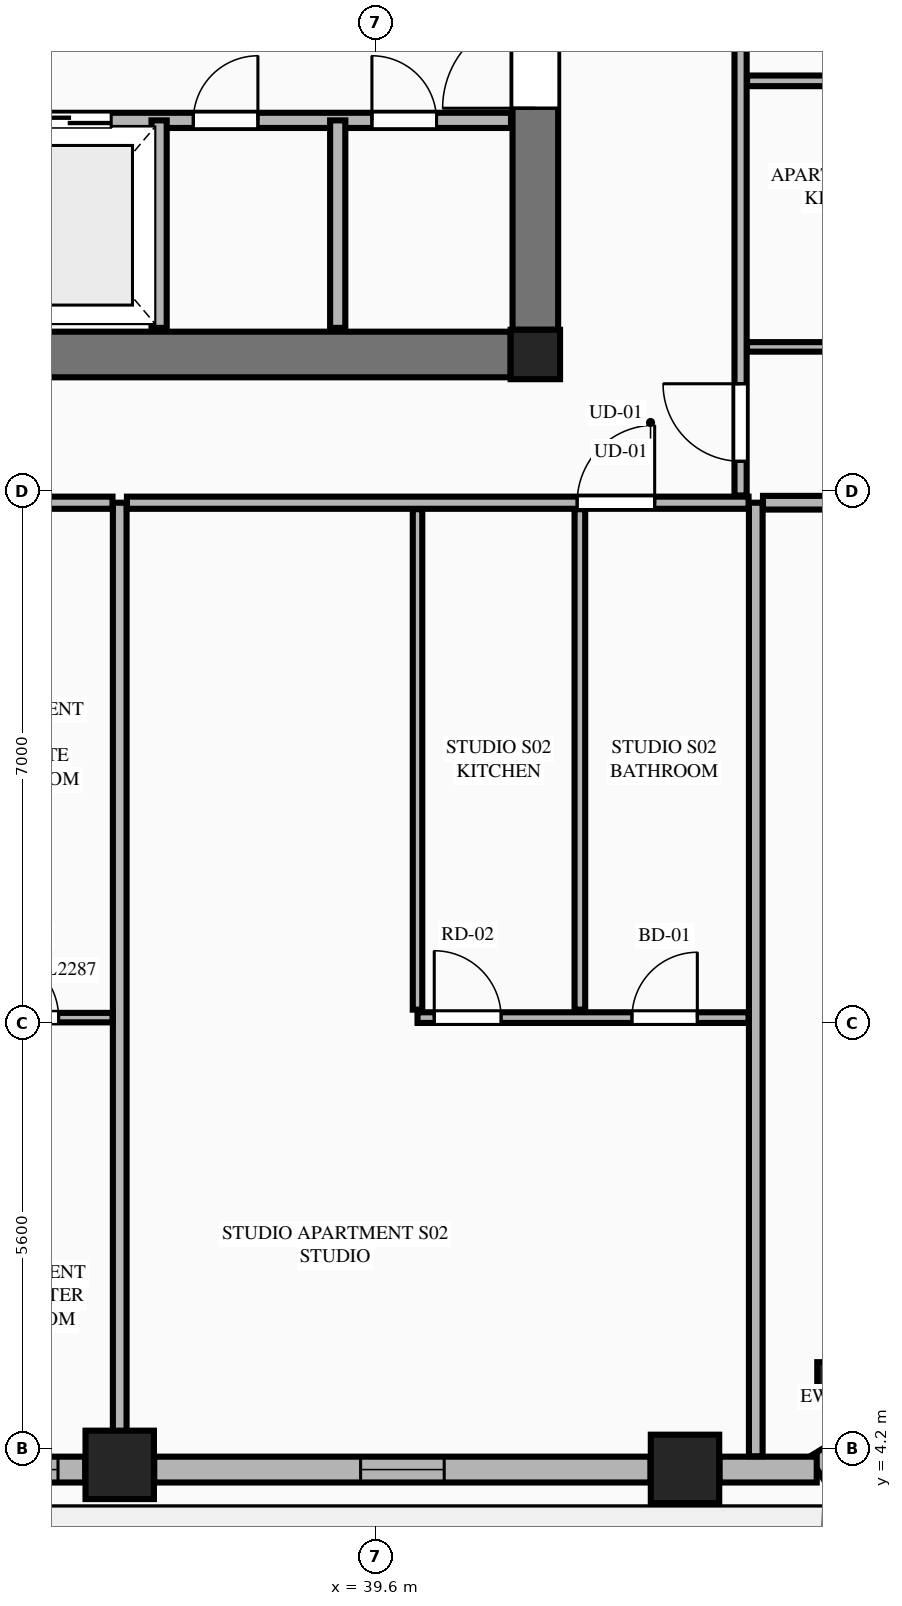
"""IFC4 building model, lengths in metres.
Left out: names, types, materials, properties, quantities, classifications, styles, units other than length and angle.
Written with IfcOpenShell. Run it as: python <this file> out.ifc"""

import sys

from ifc_helpers import new_model, si_unit, direction, frame, frame_2d, origin, origin_2d, place, context, subcontext, project, spatial, rectangle, extrude, element, fill, save


model = new_model("IFC4")
c1 = context("Model", 3, precision=1e-05, world=origin(), true_north=direction((0.0, 1.0)))
c2 = subcontext(c1, "Body", "Model", "MODEL_VIEW")
j1 = project(units=[si_unit("LENGTHUNIT", "METRE"), si_unit("PLANEANGLEUNIT", "RADIAN")], contexts=[c1])
p1 = place(None, origin())
s1 = spatial("IfcSite", under=j1, at=p1, CompositionType="ELEMENT")
p2 = place(p1, origin())
s2 = spatial("IfcBuilding", under=s1, at=p2, CompositionType="ELEMENT")
p3 = place(p2, frame((0.0, 0.0, 153.5)))
s3 = spatial("IfcBuildingStorey", under=s2, at=p3, CompositionType="ELEMENT", Elevation=153.5)
p4 = place(p3, frame((41.7, 18.6, 0.0), z_axis=(0.0, 0.0, 1.0), x_axis=(1.0, 0.0, 0.0)))
e1 = element("IfcColumn", 1, at=p4, inside=s3, PredefinedType="COLUMN", context=c2, shape_type="SweptSolid", body=[
    extrude(rectangle(XDim=0.65, YDim=0.65, at=origin_2d()), origin(), (0.0, 0.0, 1.0), 3.55),
])
p5 = place(p3, frame((23.425, 18.6, 0.0), z_axis=(0.0, 0.0, 1.0), x_axis=(1.0, 0.0, 0.0)))
e2 = element("IfcWall", 2, at=p5, inside=s3, PredefinedType="SHEAR", context=c2, shape_type="SweptSolid", body=[
    extrude(rectangle(XDim=17.95, YDim=0.6, at=frame_2d((8.975, 0.0))), origin(), (0.0, 0.0, 1.0), 3.34),
])
p6 = place(p3, frame((41.7, 18.925, 0.0), z_axis=(0.0, 0.0, 1.0), x_axis=(0.0, 1.0, 0.0)))
e3 = element("IfcWall", 3, at=p6, inside=s3, PredefinedType="SHEAR", context=c2, shape_type="SweptSolid", body=[
    extrude(rectangle(XDim=13.95, YDim=0.6, at=frame_2d((6.975, 0.0))), origin(), (0.0, 0.0, 1.0), 3.34),
])
p7 = place(p6, frame((2.915, 0.0, 0.0)))
e4 = element("IfcOpeningElement", 4, at=p7, cuts=e3, PredefinedType="OPENING", context=c2, shape_type="SweptSolid", body=[
    extrude(rectangle(XDim=1.22, YDim=2.25, at=frame_2d((0.61, 1.125))), frame((0.0, 0.31, 0.0), z_axis=(0.0, -1.0, 0.0), x_axis=(1.0, 0.0, 0.0)), (0.0, 0.0, 1.0), 0.62),
])
for number, where, z_axis, x_axis in (
    (5, (36.232, 3.992, 0.0), (0.0, 0.0, 1.0), (1.0, 0.0, 0.0)),
    (6, (43.669, 3.939, 0.0), (0.0, 0.0, 1.0), (1.0, 0.0, 0.0)),
):
    element("IfcColumn", number, at=place(p3, frame(where, z_axis=z_axis, x_axis=x_axis)), inside=s3, PredefinedType="COLUMN", context=c2, shape_type="SweptSolid", body=[
        extrude(rectangle(XDim=0.9, YDim=0.9, at=origin_2d()), origin(), (0.0, 0.0, 1.0), 3.55),
    ])
p8 = place(p3, frame((45.659, 5.093, 0.0), z_axis=(0.0, 0.0, 1.0), x_axis=(0.865160173452, 0.501495637342, 0.0)))
e7 = element("IfcColumn", 7, at=p8, inside=s3, PredefinedType="PILASTER", context=c2, shape_type="SweptSolid", body=[
    extrude(rectangle(XDim=0.5, YDim=0.35, at=origin_2d()), origin(), (0.0, 0.0, 1.0), 3.55),
])
p9 = place(p3, frame((23.42, 21.68, 0.0), z_axis=(0.0, 0.0, 1.0), x_axis=(1.0, 0.0, 0.0)))
e8 = element("IfcWall", 8, at=p9, inside=s3, PredefinedType="PLUMBINGWALL", context=c2, shape_type="SweptSolid", body=[
    extrude(rectangle(XDim=17.96, YDim=0.2, at=frame_2d((8.98, 0.0))), origin(), (0.0, 0.0, 1.0), 3.34),
])
p10 = place(p9, frame((11.6, 0.0, 0.0)))
e9 = element("IfcOpeningElement", 9, at=p10, cuts=e8, PredefinedType="OPENING", context=c2, shape_type="SweptSolid", body=[
    extrude(rectangle(XDim=1.1, YDim=2.2, at=frame_2d((0.55, 1.1))), frame((0.0, 0.11, 0.0), z_axis=(0.0, -1.0, 0.0), x_axis=(1.0, 0.0, 0.0)), (0.0, 0.0, 1.0), 0.22),
])
p11 = place(p9, frame((0.41, 0.0, 0.0)))
e10 = element("IfcOpeningElement", 10, at=p11, cuts=e8, PredefinedType="OPENING", context=c2, shape_type="SweptSolid", body=[
    extrude(rectangle(XDim=0.85, YDim=2.05, at=frame_2d((0.425, 1.025))), frame((0.0, 0.11, 0.0), z_axis=(0.0, -1.0, 0.0), x_axis=(1.0, 0.0, 0.0)), (0.0, 0.0, 1.0), 0.22),
])
p12 = place(p9, frame((4.13, 0.0, 0.0)))
e11 = element("IfcOpeningElement", 11, at=p12, cuts=e8, PredefinedType="OPENING", context=c2, shape_type="SweptSolid", body=[
    extrude(rectangle(XDim=0.85, YDim=2.05, at=frame_2d((0.425, 1.025))), frame((0.0, 0.11, 0.0), z_axis=(0.0, -1.0, 0.0), x_axis=(1.0, 0.0, 0.0)), (0.0, 0.0, 1.0), 0.22),
])
p13 = place(p9, frame((7.83, 0.0, 0.0)))
e12 = element("IfcOpeningElement", 12, at=p13, cuts=e8, PredefinedType="OPENING", context=c2, shape_type="SweptSolid", body=[
    extrude(rectangle(XDim=0.85, YDim=2.05, at=frame_2d((0.425, 1.025))), frame((0.0, 0.11, 0.0), z_axis=(0.0, -1.0, 0.0), x_axis=(1.0, 0.0, 0.0)), (0.0, 0.0, 1.0), 0.22),
])
p14 = place(p9, frame((13.78, 0.0, 0.0)))
e13 = element("IfcOpeningElement", 13, at=p14, cuts=e8, PredefinedType="OPENING", context=c2, shape_type="SweptSolid", body=[
    extrude(rectangle(XDim=0.85, YDim=2.05, at=frame_2d((0.425, 1.025))), frame((0.0, 0.11, 0.0), z_axis=(0.0, -1.0, 0.0), x_axis=(1.0, 0.0, 0.0)), (0.0, 0.0, 1.0), 0.22),
])
p15 = place(p9, frame((16.13, 0.0, 0.0)))
e14 = element("IfcOpeningElement", 14, at=p15, cuts=e8, PredefinedType="OPENING", context=c2, shape_type="SweptSolid", body=[
    extrude(rectangle(XDim=0.85, YDim=2.05, at=frame_2d((0.425, 1.025))), frame((0.0, 0.11, 0.0), z_axis=(0.0, -1.0, 0.0), x_axis=(1.0, 0.0, 0.0)), (0.0, 0.0, 1.0), 0.22),
])
for number, where, z_axis, x_axis in (
    (15, (36.75, 18.95, 0.0), (0.0, 0.0, 1.0), (0.0, 1.0, 0.0)),
    (16, (39.1, 18.95, 0.0), (0.0, 0.0, 1.0), (0.0, 1.0, 0.0)),
):
    element("IfcWall", number, at=place(p3, frame(where, z_axis=z_axis, x_axis=x_axis)), inside=s3, PredefinedType="PLUMBINGWALL", context=c2, shape_type="SweptSolid", body=[
        extrude(rectangle(XDim=2.73, YDim=0.2, at=frame_2d((1.365, 0.0))), origin(), (0.0, 0.0, 1.0), 3.34),
    ])
p16 = place(p3, frame((45.397, 3.955, 0.0), z_axis=(0.0, 0.0, 1.0), x_axis=(0.851798915137, 0.523868884523, 0.0)))
e17 = element("IfcWall", 17, at=p16, inside=s3, PredefinedType="STANDARD", context=c2, shape_type="SweptSolid", body=[
    extrude(rectangle(XDim=1.848, YDim=0.34, at=frame_2d((0.924, 0.0))), origin(), (0.0, 0.0, 1.0), 3.34),
])
p17 = place(p3, frame((29.022, 3.93, 0.0), z_axis=(0.0, 0.0, 1.0), x_axis=(1.0, 0.0, 0.0)))
e18 = element("IfcWall", 18, at=p17, inside=s3, PredefinedType="STANDARD", context=c2, shape_type="SweptSolid", body=[
    extrude(rectangle(XDim=6.756, YDim=0.34, at=frame_2d((3.378, 0.0))), origin(), (0.0, 0.0, 1.0), 2.797),
])
p18 = place(p17, frame((1.813, 0.0, 0.0)))
e19 = element("IfcOpeningElement", 19, at=p18, cuts=e18, PredefinedType="OPENING", context=c2, shape_type="SweptSolid", body=[
    extrude(rectangle(XDim=1.1, YDim=2.25, at=frame_2d((0.55, 1.125))), frame((0.0, 0.18, 0.0), z_axis=(0.0, -1.0, 0.0), x_axis=(1.0, 0.0, 0.0)), (0.0, 0.0, 1.0), 0.36),
])
p19 = place(p17, frame((5.298, 0.0, 0.75)))
e20 = element("IfcOpeningElement", 20, at=p19, cuts=e18, PredefinedType="OPENING", context=c2, shape_type="SweptSolid", body=[
    extrude(rectangle(XDim=1.1, YDim=1.897, at=frame_2d((0.55, 0.948))), frame((0.0, 0.18, 0.0), z_axis=(0.0, -1.0, 0.0), x_axis=(1.0, 0.0, 0.0)), (0.0, 0.0, 1.0), 0.36),
])
p20 = place(p3, frame((36.686, 3.93, 0.0), z_axis=(0.0, 0.0, 1.0), x_axis=(1.0, 0.0, 0.0)))
e21 = element("IfcWall", 21, at=p20, inside=s3, PredefinedType="STANDARD", context=c2, shape_type="SweptSolid", body=[
    extrude(rectangle(XDim=6.529, YDim=0.34, at=frame_2d((3.265, 0.0))), origin(), (0.0, 0.0, 1.0), 2.797),
])
p21 = place(p20, frame((2.715, 0.0, 0.75)))
e22 = element("IfcOpeningElement", 22, at=p21, cuts=e21, PredefinedType="OPENING", context=c2, shape_type="SweptSolid", body=[
    extrude(rectangle(XDim=1.1, YDim=1.897, at=frame_2d((0.55, 0.948))), frame((0.0, 0.18, 0.0), z_axis=(0.0, -1.0, 0.0), x_axis=(1.0, 0.0, 0.0)), (0.0, 0.0, 1.0), 0.36),
])
p22 = place(p3, frame((44.123, 3.93, 0.0), z_axis=(0.0, 0.0, 1.0), x_axis=(1.0, 0.0, 0.0)))
e23 = element("IfcWall", 23, at=p22, inside=s3, PredefinedType="STANDARD", context=c2, shape_type="SweptSolid", body=[
    extrude(rectangle(XDim=1.279, YDim=0.34, at=frame_2d((0.64, 0.0))), origin(), (0.0, 0.0, 1.0), 3.34),
])
p23 = place(p3, frame((36.232, 4.105, 0.0), z_axis=(0.0, 0.0, 1.0), x_axis=(0.0, 1.0, 0.0)))
e24 = element("IfcWall", 24, at=p23, inside=s3, PredefinedType="PARTITIONING", context=c2, shape_type="SweptSolid", body=[
    extrude(rectangle(XDim=12.545, YDim=0.18, at=frame_2d((6.272, 0.0))), origin(), (0.0, 0.0, 1.0), 2.722),
])
p24 = place(p3, frame((44.6, 4.105, 0.0), z_axis=(0.0, 0.0, 1.0), x_axis=(0.0, 1.0, 0.0)))
e25 = element("IfcWall", 25, at=p24, inside=s3, PredefinedType="PARTITIONING", context=c2, shape_type="SweptSolid", body=[
    extrude(rectangle(XDim=12.545, YDim=0.18, at=frame_2d((6.272, 0.0))), origin(), (0.0, 0.0, 1.0), 3.34),
])
p25 = place(p3, frame((20.295, 16.65, 0.0), z_axis=(0.0, 0.0, 1.0), x_axis=(1.0, 0.0, 0.0)))
e26 = element("IfcWall", 26, at=p25, inside=s3, PredefinedType="PARTITIONING", context=c2, shape_type="SweptSolid", body=[
    extrude(rectangle(XDim=15.842, YDim=0.16, at=frame_2d((7.921, 0.0))), origin(), (0.0, 0.0, 1.0), 3.34),
])
p26 = place(p25, frame((0.405, 0.0, 0.0)))
e27 = element("IfcOpeningElement", 27, at=p26, cuts=e26, PredefinedType="OPENING", context=c2, shape_type="SweptSolid", body=[
    extrude(rectangle(XDim=1.35, YDim=2.35, at=frame_2d((0.675, 1.175))), frame((0.0, 0.09, 0.0), z_axis=(0.0, -1.0, 0.0), x_axis=(1.0, 0.0, 0.0)), (0.0, 0.0, 1.0), 0.18),
])
p27 = place(p3, frame((33.85, 9.876, 0.0), z_axis=(0.0, 0.0, 1.0), x_axis=(1.0, 0.0, 0.0)))
e28 = element("IfcWall", 28, at=p27, inside=s3, PredefinedType="PARTITIONING", context=c2, shape_type="SweptSolid", body=[
    extrude(rectangle(XDim=2.287, YDim=0.125, at=frame_2d((1.144, 0.0))), origin(), (0.0, 0.0, 1.0), 3.34),
])
p28 = place(p27, frame((0.718, 0.0, 0.0)))
e29 = element("IfcOpeningElement", 29, at=p28, cuts=e28, PredefinedType="OPENING", context=c2, shape_type="SweptSolid", body=[
    extrude(rectangle(XDim=0.86, YDim=2.1, at=frame_2d((0.43, 1.05))), frame((0.0, 0.073, 0.0), z_axis=(0.0, -1.0, 0.0), x_axis=(1.0, 0.0, 0.0)), (0.0, 0.0, 1.0), 0.145),
])
p29 = place(p3, frame((36.327, 16.65, 0.0), z_axis=(0.0, 0.0, 1.0), x_axis=(1.0, 0.0, 0.0)))
e30 = element("IfcWall", 30, at=p29, inside=s3, PredefinedType="PARTITIONING", context=c2, shape_type="SweptSolid", body=[
    extrude(rectangle(XDim=8.178, YDim=0.16, at=frame_2d((4.089, 0.0))), origin(), (0.0, 0.0, 1.0), 3.34),
])
p30 = place(p29, frame((5.923, 0.0, 0.0)))
e31 = element("IfcOpeningElement", 31, at=p30, cuts=e30, PredefinedType="OPENING", context=c2, shape_type="SweptSolid", body=[
    extrude(rectangle(XDim=1.02, YDim=2.25, at=frame_2d((0.51, 1.125))), frame((0.0, 0.09, 0.0), z_axis=(0.0, -1.0, 0.0), x_axis=(1.0, 0.0, 0.0)), (0.0, 0.0, 1.0), 0.18),
])
p31 = place(p3, frame((40.15, 9.981, 0.0), z_axis=(0.0, 0.0, 1.0), x_axis=(0.0, 1.0, 0.0)))
e32 = element("IfcWall", 32, at=p31, inside=s3, PredefinedType="PARTITIONING", context=c2, shape_type="SweptSolid", body=[
    extrude(rectangle(XDim=6.584, YDim=0.125, at=frame_2d((3.292, 0.0))), origin(), (0.0, 0.0, 1.0), 3.34),
])
p32 = place(p3, frame((40.15, 9.876, 0.0), z_axis=(0.0, 0.0, 1.0), x_axis=(1.0, 0.0, 0.0)))
e33 = element("IfcWall", 33, at=p32, inside=s3, PredefinedType="PLUMBINGWALL", context=c2, shape_type="SweptSolid", body=[
    extrude(rectangle(XDim=4.355, YDim=0.14, at=frame_2d((2.177, 0.0))), origin(), (0.0, 0.0, 1.0), 3.34),
])
p33 = place(p32, frame((2.821, 0.0, 0.0)))
e34 = element("IfcOpeningElement", 34, at=p33, cuts=e33, PredefinedType="OPENING", context=c2, shape_type="SweptSolid", body=[
    extrude(rectangle(XDim=0.86, YDim=2.1, at=frame_2d((0.43, 1.05))), frame((0.0, 0.08, 0.0), z_axis=(0.0, -1.0, 0.0), x_axis=(1.0, 0.0, 0.0)), (0.0, 0.0, 1.0), 0.16),
])
p34 = place(p32, frame((0.22, 0.0, 0.0)))
e35 = element("IfcOpeningElement", 35, at=p34, cuts=e33, PredefinedType="OPENING", context=c2, shape_type="SweptSolid", body=[
    extrude(rectangle(XDim=0.88, YDim=2.15, at=frame_2d((0.44, 1.075))), frame((0.0, 0.08, 0.0), z_axis=(0.0, -1.0, 0.0), x_axis=(1.0, 0.0, 0.0)), (0.0, 0.0, 1.0), 0.16),
])
p35 = place(p3, frame((42.286, 9.981, 0.0), z_axis=(0.0, 0.0, 1.0), x_axis=(0.0, 1.0, 0.0)))
e36 = element("IfcWall", 36, at=p35, inside=s3, PredefinedType="PLUMBINGWALL", context=c2, shape_type="SweptSolid", body=[
    extrude(rectangle(XDim=6.584, YDim=0.14, at=frame_2d((3.292, 0.0))), origin(), (0.0, 0.0, 1.0), 2.722),
])
p36 = place(p3, frame((44.695, 16.65, 0.0), z_axis=(0.0, 0.0, 1.0), x_axis=(1.0, 0.0, 0.0)))
e37 = element("IfcWall", 37, at=p36, inside=s3, PredefinedType="PARTITIONING", context=c2, shape_type="SweptSolid", body=[
    extrude(rectangle(XDim=7.996, YDim=0.18, at=frame_2d((3.998, 0.0))), origin(), (0.0, 0.0, 1.0), 3.34),
])
p37 = place(p3, frame((44.4, 16.745, 0.0), z_axis=(0.0, 0.0, 1.0), x_axis=(0.0, 1.0, 0.0)))
e38 = element("IfcWall", 38, at=p37, inside=s3, PredefinedType="PARTITIONING", context=c2, shape_type="SweptSolid", body=[
    extrude(rectangle(XDim=18.31, YDim=0.16, at=frame_2d((9.155, 0.0))), origin(), (0.0, 0.0, 1.0), 3.34),
])
p38 = place(p37, frame((0.45, 0.0, 0.0)))
e39 = element("IfcOpeningElement", 39, at=p38, cuts=e38, PredefinedType="OPENING", context=c2, shape_type="SweptSolid", body=[
    extrude(rectangle(XDim=1.02, YDim=2.25, at=frame_2d((0.51, 1.125))), frame((0.0, 0.09, 0.0), z_axis=(0.0, -1.0, 0.0), x_axis=(1.0, 0.0, 0.0)), (0.0, 0.0, 1.0), 0.18),
])
p39 = place(p3, frame((44.485, 18.7, 0.0), z_axis=(0.0, 0.0, 1.0), x_axis=(1.0, 0.0, 0.0)))
e40 = element("IfcWall", 40, at=p39, inside=s3, PredefinedType="PARTITIONING", context=c2, shape_type="SweptSolid", body=[
    extrude(rectangle(XDim=2.83, YDim=0.125, at=frame_2d((1.415, 0.0))), origin(), (0.0, 0.0, 1.0), 2.722),
])
p40 = place(p3, frame((44.485, 22.2, 0.0), z_axis=(0.0, 0.0, 1.0), x_axis=(1.0, 0.0, 0.0)))
e41 = element("IfcWall", 41, at=p40, inside=s3, PredefinedType="PLUMBINGWALL", context=c2, shape_type="SweptSolid", body=[
    extrude(rectangle(XDim=2.83, YDim=0.14, at=frame_2d((1.415, 0.0))), origin(), (0.0, 0.0, 1.0), 3.34),
])
p41 = place(p7, origin())
e42 = element("IfcDoor", 42, at=p41, inside=s3, OperationType="SINGLE_SWING_LEFT", PredefinedType="DOOR", context=c2, shape_type="SweptSolid", body=[
    extrude(rectangle(XDim=1.22, YDim=2.25, at=frame_2d((0.61, 1.125))), frame((0.0, 0.025, 0.0), z_axis=(0.0, -1.0, 0.0), x_axis=(1.0, 0.0, 0.0)), (0.0, 0.0, 1.0), 0.05),
])
fill(e4, e42)
p42 = place(p10, origin())
e43 = element("IfcDoor", 43, at=p42, inside=s3, OperationType="DOUBLE_DOOR_SLIDING", PredefinedType="DOOR", context=c2, shape_type="SweptSolid", body=[
    extrude(rectangle(XDim=1.1, YDim=2.2, at=frame_2d((0.55, 1.1))), frame((0.0, 0.025, 0.0), z_axis=(0.0, -1.0, 0.0), x_axis=(1.0, 0.0, 0.0)), (0.0, 0.0, 1.0), 0.05),
])
fill(e9, e43)
p43 = place(p14, origin())
e44 = element("IfcDoor", 44, at=p43, inside=s3, OperationType="SINGLE_SWING_RIGHT", PredefinedType="DOOR", context=c2, shape_type="SweptSolid", body=[
    extrude(rectangle(XDim=0.85, YDim=2.05, at=frame_2d((0.425, 1.025))), frame((0.0, 0.025, 0.0), z_axis=(0.0, -1.0, 0.0), x_axis=(1.0, 0.0, 0.0)), (0.0, 0.0, 1.0), 0.05),
])
fill(e13, e44)
p44 = place(p15, origin())
e45 = element("IfcDoor", 45, at=p44, inside=s3, OperationType="SINGLE_SWING_LEFT", PredefinedType="DOOR", context=c2, shape_type="SweptSolid", body=[
    extrude(rectangle(XDim=0.85, YDim=2.05, at=frame_2d((0.425, 1.025))), frame((0.0, 0.025, 0.0), z_axis=(0.0, -1.0, 0.0), x_axis=(1.0, 0.0, 0.0)), (0.0, 0.0, 1.0), 0.05),
])
fill(e14, e45)
p45 = place(p21, origin())
e46 = element("IfcWindow", 46, at=p45, inside=s3, PartitioningType="SINGLE_PANEL", PredefinedType="WINDOW", context=c2, shape_type="SweptSolid", body=[
    extrude(rectangle(XDim=1.1, YDim=1.897, at=frame_2d((0.55, 0.948))), frame((0.0, 0.03, 0.0), z_axis=(0.0, -1.0, 0.0), x_axis=(1.0, 0.0, 0.0)), (0.0, 0.0, 1.0), 0.06),
])
fill(e22, e46)
p46 = place(p28, origin())
e47 = element("IfcDoor", 47, at=p46, inside=s3, OperationType="SINGLE_SWING_LEFT", PredefinedType="DOOR", context=c2, shape_type="SweptSolid", body=[
    extrude(rectangle(XDim=0.86, YDim=2.1, at=frame_2d((0.43, 1.05))), frame((0.0, 0.025, 0.0), z_axis=(0.0, -1.0, 0.0), x_axis=(1.0, 0.0, 0.0)), (0.0, 0.0, 1.0), 0.05),
])
fill(e29, e47)
p47 = place(p33, origin())
e48 = element("IfcDoor", 48, at=p47, inside=s3, OperationType="SINGLE_SWING_RIGHT", PredefinedType="DOOR", context=c2, shape_type="SweptSolid", body=[
    extrude(rectangle(XDim=0.86, YDim=2.1, at=frame_2d((0.43, 1.05))), frame((0.0, 0.025, 0.0), z_axis=(0.0, -1.0, 0.0), x_axis=(1.0, 0.0, 0.0)), (0.0, 0.0, 1.0), 0.05),
])
fill(e34, e48)
p48 = place(p30, origin())
e49 = element("IfcDoor", 49, at=p48, inside=s3, OperationType="SINGLE_SWING_RIGHT", PredefinedType="DOOR", context=c2, shape_type="SweptSolid", body=[
    extrude(rectangle(XDim=1.02, YDim=2.25, at=frame_2d((0.51, 1.125))), frame((0.0, 0.025, 0.0), z_axis=(0.0, -1.0, 0.0), x_axis=(1.0, 0.0, 0.0)), (0.0, 0.0, 1.0), 0.05),
])
fill(e31, e49)
p49 = place(p34, origin())
e50 = element("IfcDoor", 50, at=p49, inside=s3, OperationType="SINGLE_SWING_LEFT", PredefinedType="DOOR", context=c2, shape_type="SweptSolid", body=[
    extrude(rectangle(XDim=0.88, YDim=2.15, at=frame_2d((0.44, 1.075))), frame((0.0, 0.025, 0.0), z_axis=(0.0, -1.0, 0.0), x_axis=(1.0, 0.0, 0.0)), (0.0, 0.0, 1.0), 0.05),
])
fill(e35, e50)
p50 = place(p38, origin())
e51 = element("IfcDoor", 51, at=p50, inside=s3, OperationType="SINGLE_SWING_RIGHT", PredefinedType="DOOR", context=c2, shape_type="SweptSolid", body=[
    extrude(rectangle(XDim=1.02, YDim=2.25, at=frame_2d((0.51, 1.125))), frame((0.0, 0.025, 0.0), z_axis=(0.0, -1.0, 0.0), x_axis=(1.0, 0.0, 0.0)), (0.0, 0.0, 1.0), 0.05),
])
fill(e39, e51)
p51 = place(p19, origin())
e52 = element("IfcWindow", 52, at=p51, inside=s3, PartitioningType="SINGLE_PANEL", PredefinedType="WINDOW", context=c2, shape_type="SweptSolid", body=[
    extrude(rectangle(XDim=1.1, YDim=1.897, at=frame_2d((0.55, 0.948))), frame((0.0, 0.03, 0.0), z_axis=(0.0, -1.0, 0.0), x_axis=(1.0, 0.0, 0.0)), (0.0, 0.0, 1.0), 0.06),
])
fill(e20, e52)
save(model, sys.argv[1])
